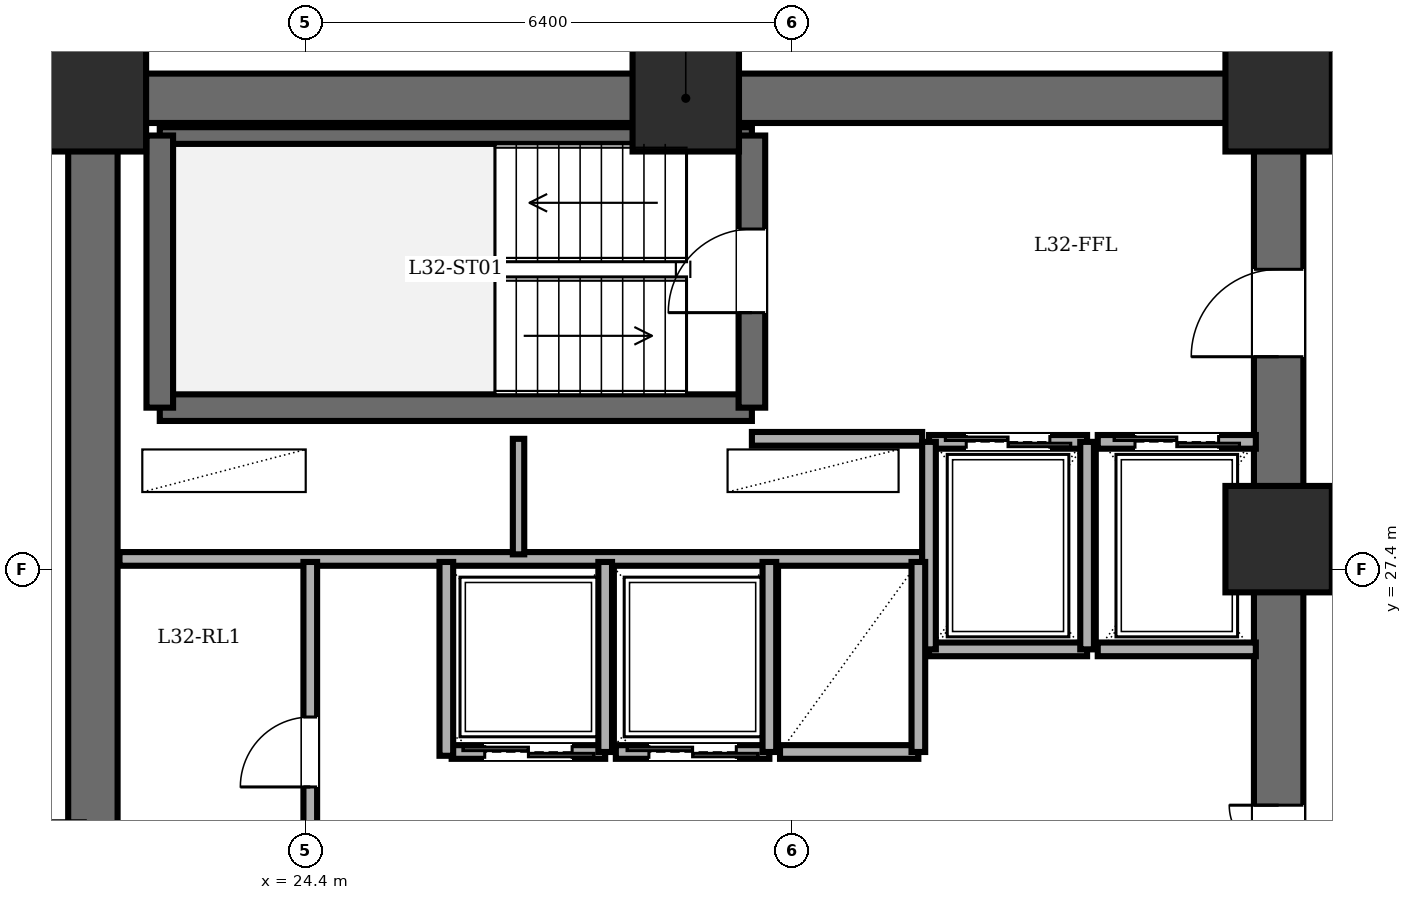
"""IFC4 building model, lengths in metres.
Left out: names, types, materials, properties, quantities, classifications, styles, units other than length and angle.
Written with IfcOpenShell. Run it as: python <this file> out.ifc"""

import sys

from ifc_helpers import new_model, si_unit, direction, frame, frame_2d, origin, origin_2d, place, context, subcontext, project, spatial, rectangle, extrude, element, fill, save


model = new_model("IFC4")
c1 = context("Model", 3, precision=1e-05, world=origin(), true_north=direction((0.0, 1.0)))
c2 = subcontext(c1, "Body", "Model", "MODEL_VIEW")
j1 = project(units=[si_unit("LENGTHUNIT", "METRE"), si_unit("PLANEANGLEUNIT", "RADIAN")], contexts=[c1])
p1 = place(None, origin())
s1 = spatial("IfcSite", under=j1, at=p1, CompositionType="ELEMENT")
p2 = place(p1, origin())
s2 = spatial("IfcBuilding", under=s1, at=p2, CompositionType="ELEMENT")
p3 = place(p2, frame((0.0, 0.0, 122.3)))
s3 = spatial("IfcBuildingStorey", under=s2, at=p3, CompositionType="ELEMENT", Elevation=122.3)
for number, where, z_axis, x_axis in (
    (1, (37.2, 27.8, 0.0), (0.0, 0.0, 1.0), (1.0, 0.0, 0.0)),
    (2, (37.2, 33.6, 0.0), (0.0, 0.0, 1.0), (1.0, 0.0, 0.0)),
    (3, (29.4, 33.6, 0.0), (0.0, 0.0, 1.0), (1.0, 0.0, 0.0)),
    (4, (21.6, 33.6, 0.0), (0.0, 0.0, 1.0), (1.0, 0.0, 0.0)),
):
    element("IfcColumn", number, at=place(p3, frame(where, z_axis=z_axis, x_axis=x_axis)), inside=s3, PredefinedType="COLUMN", context=c2, shape_type="SweptSolid", body=[
        extrude(rectangle(XDim=1.4, YDim=1.4, at=origin_2d()), origin(), (0.0, 0.0, 1.0), 3.6),
    ])
p4 = place(p3, frame((21.6, 14.4, 0.0), z_axis=(0.0, 0.0, 1.0), x_axis=(0.0, 1.0, 0.0)))
e5 = element("IfcWall", 5, at=p4, inside=s3, PredefinedType="SHEAR", context=c2, shape_type="SweptSolid", body=[
    extrude(rectangle(XDim=19.2, YDim=0.65, at=frame_2d((9.6, 0.0))), origin(), (0.0, 0.0, 1.0), 3.4),
])
p5 = place(p3, frame((21.6, 33.6, 0.0), z_axis=(0.0, 0.0, 1.0), x_axis=(1.0, 0.0, 0.0)))
e6 = element("IfcWall", 6, at=p5, inside=s3, PredefinedType="SHEAR", context=c2, shape_type="SweptSolid", body=[
    extrude(rectangle(XDim=15.6, YDim=0.65, at=frame_2d((7.8, 0.0))), origin(), (0.0, 0.0, 1.0), 3.4),
])
p6 = place(p3, frame((37.2, 14.4, 0.0), z_axis=(0.0, 0.0, 1.0), x_axis=(0.0, 1.0, 0.0)))
e7 = element("IfcWall", 7, at=p6, inside=s3, PredefinedType="SHEAR", context=c2, shape_type="SweptSolid", body=[
    extrude(rectangle(XDim=19.2, YDim=0.65, at=frame_2d((9.6, 0.0))), origin(), (0.0, 0.0, 1.0), 3.4),
])
p7 = place(p6, frame((15.8, 0.0, 0.0)))
e8 = element("IfcOpeningElement", 8, at=p7, cuts=e7, PredefinedType="OPENING", context=c2, shape_type="SweptSolid", body=[
    extrude(rectangle(XDim=1.15, YDim=2.15, at=frame_2d((0.575, 1.075))), frame((0.0, 0.335, 0.0), z_axis=(0.0, -1.0, 0.0), x_axis=(1.0, 0.0, 0.0)), (0.0, 0.0, 1.0), 0.67),
])
p8 = place(p6, frame((3.6, 0.0, 0.0)))
e9 = element("IfcOpeningElement", 9, at=p8, cuts=e7, PredefinedType="OPENING", context=c2, shape_type="SweptSolid", body=[
    extrude(rectangle(XDim=1.1, YDim=2.15, at=frame_2d((0.55, 1.075))), frame((0.0, 0.335, 0.0), z_axis=(0.0, -1.0, 0.0), x_axis=(1.0, 0.0, 0.0)), (0.0, 0.0, 1.0), 0.67),
])
p9 = place(p6, frame((8.6, 0.0, 0.0)))
e10 = element("IfcOpeningElement", 10, at=p9, cuts=e7, PredefinedType="OPENING", context=c2, shape_type="SweptSolid", body=[
    extrude(rectangle(XDim=1.3, YDim=2.2, at=frame_2d((0.65, 1.1))), frame((0.0, 0.335, 0.0), z_axis=(0.0, -1.0, 0.0), x_axis=(1.0, 0.0, 0.0)), (0.0, 0.0, 1.0), 0.67),
])
p10 = place(p3, frame((22.48, 29.53, 0.0), z_axis=(0.0, 0.0, 1.0), x_axis=(1.0, 0.0, 0.0)))
e11 = element("IfcWall", 11, at=p10, inside=s3, PredefinedType="SOLIDWALL", context=c2, shape_type="SweptSolid", body=[
    extrude(rectangle(XDim=7.79, YDim=0.35, at=frame_2d((3.895, 0.0))), origin(), (0.0, 0.0, 1.0), 3.4),
])
p11 = place(p3, frame((22.48, 33.11, 0.0), z_axis=(0.0, 0.0, 1.0), x_axis=(1.0, 0.0, 0.0)))
e12 = element("IfcWall", 12, at=p11, inside=s3, PredefinedType="PARTITIONING", context=c2, shape_type="SweptSolid", body=[
    extrude(rectangle(XDim=7.79, YDim=0.22, at=frame_2d((3.895, 0.0))), origin(), (0.0, 0.0, 1.0), 3.4),
])
p12 = place(p3, frame((22.48, 29.53, 0.0), z_axis=(0.0, 0.0, 1.0), x_axis=(0.0, 1.0, 0.0)))
e13 = element("IfcWall", 13, at=p12, inside=s3, PredefinedType="SOLIDWALL", context=c2, shape_type="SweptSolid", body=[
    extrude(rectangle(XDim=3.58, YDim=0.35, at=frame_2d((1.79, 0.0))), origin(), (0.0, 0.0, 1.0), 3.4),
])
p13 = place(p3, frame((30.27, 29.53, 0.0), z_axis=(0.0, 0.0, 1.0), x_axis=(0.0, 1.0, 0.0)))
e14 = element("IfcWall", 14, at=p13, inside=s3, PredefinedType="SOLIDWALL", context=c2, shape_type="SweptSolid", body=[
    extrude(rectangle(XDim=3.58, YDim=0.35, at=frame_2d((1.79, 0.0))), origin(), (0.0, 0.0, 1.0), 3.4),
])
p14 = place(p13, frame((1.25, 0.0, 0.0)))
e15 = element("IfcOpeningElement", 15, at=p14, cuts=e14, PredefinedType="OPENING", context=c2, shape_type="SweptSolid", body=[
    extrude(rectangle(XDim=1.1, YDim=2.15, at=frame_2d((0.55, 1.075))), frame((0.0, 0.185, 0.0), z_axis=(0.0, -1.0, 0.0), x_axis=(1.0, 0.0, 0.0)), (0.0, 0.0, 1.0), 0.37),
])
p15 = place(p3, frame((30.27, 29.12, 0.0), z_axis=(0.0, 0.0, 1.0), x_axis=(1.0, 0.0, 0.0)))
e16 = element("IfcWall", 16, at=p15, inside=s3, PredefinedType="PARTITIONING", context=c2, shape_type="SweptSolid", body=[
    extrude(rectangle(XDim=2.24, YDim=0.18, at=frame_2d((1.12, 0.0))), origin(), (0.0, 0.0, 1.0), 3.4),
])
p16 = place(p3, frame((21.95, 27.54, 0.0), z_axis=(0.0, 0.0, 1.0), x_axis=(1.0, 0.0, 0.0)))
e17 = element("IfcWall", 17, at=p16, inside=s3, PredefinedType="PARTITIONING", context=c2, shape_type="SweptSolid", body=[
    extrude(rectangle(XDim=10.56, YDim=0.18, at=frame_2d((5.28, 0.0))), origin(), (0.0, 0.0, 1.0), 3.4),
])
p17 = place(p3, frame((27.2, 27.6, 0.0), z_axis=(0.0, 0.0, 1.0), x_axis=(0.0, 1.0, 0.0)))
e18 = element("IfcWall", 18, at=p17, inside=s3, PredefinedType="PARTITIONING", context=c2, shape_type="SweptSolid", body=[
    extrude(rectangle(XDim=1.52, YDim=0.15, at=frame_2d((0.76, 0.0))), origin(), (0.0, 0.0, 1.0), 3.4),
])
p18 = place(p3, frame((32.6, 29.08, 0.0), z_axis=(0.0, 0.0, 1.0), x_axis=(1.0, 0.0, 0.0)))
e19 = element("IfcWall", 19, at=p18, inside=s3, PredefinedType="PARTITIONING", context=c2, shape_type="SweptSolid", body=[
    extrude(rectangle(XDim=2.08, YDim=0.18, at=frame_2d((1.04, 0.0))), origin(), (0.0, 0.0, 1.0), 3.4),
])
p19 = place(p18, frame((0.49, 0.0, 0.0)))
e20 = element("IfcOpeningElement", 20, at=p19, cuts=e19, PredefinedType="OPENING", context=c2, shape_type="SweptSolid", body=[
    extrude(rectangle(XDim=1.1, YDim=2.2, at=frame_2d((0.55, 1.1))), frame((0.0, 0.1, 0.0), z_axis=(0.0, -1.0, 0.0), x_axis=(1.0, 0.0, 0.0)), (0.0, 0.0, 1.0), 0.2),
])
p20 = place(p3, frame((34.68, 26.35, 0.0), z_axis=(0.0, 0.0, 1.0), x_axis=(-1.0, 0.0, 0.0)))
e21 = element("IfcWall", 21, at=p20, inside=s3, PredefinedType="PARTITIONING", context=c2, shape_type="SweptSolid", body=[
    extrude(rectangle(XDim=2.08, YDim=0.18, at=frame_2d((1.04, 0.0))), origin(), (0.0, 0.0, 1.0), 3.4),
])
for number, where, z_axis, x_axis in (
    (22, (34.68, 26.35, 0.0), (0.0, 0.0, 1.0), (0.0, 1.0, 0.0)),
    (23, (32.6, 29.08, 0.0), (0.0, 0.0, 1.0), (0.0, -1.0, 0.0)),
):
    element("IfcWall", number, at=place(p3, frame(where, z_axis=z_axis, x_axis=x_axis)), inside=s3, PredefinedType="PARTITIONING", context=c2, shape_type="SweptSolid", body=[
        extrude(rectangle(XDim=2.73, YDim=0.18, at=frame_2d((1.365, 0.0))), origin(), (0.0, 0.0, 1.0), 3.4),
    ])
p21 = place(p3, frame((34.82, 29.08, 0.0), z_axis=(0.0, 0.0, 1.0), x_axis=(1.0, 0.0, 0.0)))
e24 = element("IfcWall", 24, at=p21, inside=s3, PredefinedType="PARTITIONING", context=c2, shape_type="SweptSolid", body=[
    extrude(rectangle(XDim=2.08, YDim=0.18, at=frame_2d((1.04, 0.0))), origin(), (0.0, 0.0, 1.0), 3.4),
])
p22 = place(p21, frame((0.49, 0.0, 0.0)))
e25 = element("IfcOpeningElement", 25, at=p22, cuts=e24, PredefinedType="OPENING", context=c2, shape_type="SweptSolid", body=[
    extrude(rectangle(XDim=1.1, YDim=2.2, at=frame_2d((0.55, 1.1))), frame((0.0, 0.1, 0.0), z_axis=(0.0, -1.0, 0.0), x_axis=(1.0, 0.0, 0.0)), (0.0, 0.0, 1.0), 0.2),
])
p23 = place(p3, frame((36.9, 26.35, 0.0), z_axis=(0.0, 0.0, 1.0), x_axis=(-1.0, 0.0, 0.0)))
e26 = element("IfcWall", 26, at=p23, inside=s3, PredefinedType="PARTITIONING", context=c2, shape_type="SweptSolid", body=[
    extrude(rectangle(XDim=2.08, YDim=0.18, at=frame_2d((1.04, 0.0))), origin(), (0.0, 0.0, 1.0), 3.4),
])
p24 = place(p3, frame((28.34, 25.0, 0.0), z_axis=(0.0, 0.0, 1.0), x_axis=(-1.0, 0.0, 0.0)))
e27 = element("IfcWall", 27, at=p24, inside=s3, PredefinedType="PARTITIONING", context=c2, shape_type="SweptSolid", body=[
    extrude(rectangle(XDim=2.02, YDim=0.18, at=frame_2d((1.01, 0.0))), origin(), (0.0, 0.0, 1.0), 3.4),
])
p25 = place(p24, frame((0.435, 0.0, 0.0)))
e28 = element("IfcOpeningElement", 28, at=p25, cuts=e27, PredefinedType="OPENING", context=c2, shape_type="SweptSolid", body=[
    extrude(rectangle(XDim=1.15, YDim=2.2, at=frame_2d((0.575, 1.1))), frame((0.0, 0.1, 0.0), z_axis=(0.0, -1.0, 0.0), x_axis=(1.0, 0.0, 0.0)), (0.0, 0.0, 1.0), 0.2),
])
p26 = place(p3, frame((28.34, 25.0, 0.0), z_axis=(0.0, 0.0, 1.0), x_axis=(0.0, 1.0, 0.0)))
e29 = element("IfcWall", 29, at=p26, inside=s3, PredefinedType="PARTITIONING", context=c2, shape_type="SweptSolid", body=[
    extrude(rectangle(XDim=2.5, YDim=0.18, at=frame_2d((1.25, 0.0))), origin(), (0.0, 0.0, 1.0), 3.4),
])
p27 = place(p3, frame((30.5, 25.0, 0.0), z_axis=(0.0, 0.0, 1.0), x_axis=(-1.0, 0.0, 0.0)))
e30 = element("IfcWall", 30, at=p27, inside=s3, PredefinedType="PARTITIONING", context=c2, shape_type="SweptSolid", body=[
    extrude(rectangle(XDim=2.02, YDim=0.18, at=frame_2d((1.01, 0.0))), origin(), (0.0, 0.0, 1.0), 3.4),
])
p28 = place(p27, frame((0.435, 0.0, 0.0)))
e31 = element("IfcOpeningElement", 31, at=p28, cuts=e30, PredefinedType="OPENING", context=c2, shape_type="SweptSolid", body=[
    extrude(rectangle(XDim=1.15, YDim=2.2, at=frame_2d((0.575, 1.1))), frame((0.0, 0.1, 0.0), z_axis=(0.0, -1.0, 0.0), x_axis=(1.0, 0.0, 0.0)), (0.0, 0.0, 1.0), 0.2),
])
p29 = place(p3, frame((30.5, 25.0, 0.0), z_axis=(0.0, 0.0, 1.0), x_axis=(0.0, 1.0, 0.0)))
e32 = element("IfcWall", 32, at=p29, inside=s3, PredefinedType="PARTITIONING", context=c2, shape_type="SweptSolid", body=[
    extrude(rectangle(XDim=2.5, YDim=0.18, at=frame_2d((1.25, 0.0))), origin(), (0.0, 0.0, 1.0), 3.4),
])
p30 = place(p3, frame((32.46, 25.0, 0.0), z_axis=(0.0, 0.0, 1.0), x_axis=(-1.0, 0.0, 0.0)))
e33 = element("IfcWall", 33, at=p30, inside=s3, PredefinedType="PARTITIONING", context=c2, shape_type="SweptSolid", body=[
    extrude(rectangle(XDim=1.82, YDim=0.18, at=frame_2d((0.91, 0.0))), origin(), (0.0, 0.0, 1.0), 3.4),
])
p31 = place(p3, frame((32.46, 25.0, 0.0), z_axis=(0.0, 0.0, 1.0), x_axis=(0.0, 1.0, 0.0)))
e34 = element("IfcWall", 34, at=p31, inside=s3, PredefinedType="PARTITIONING", context=c2, shape_type="SweptSolid", body=[
    extrude(rectangle(XDim=2.5, YDim=0.18, at=frame_2d((1.25, 0.0))), origin(), (0.0, 0.0, 1.0), 3.4),
])
p32 = place(p3, frame((24.46, 22.5, 0.0), z_axis=(0.0, 0.0, 1.0), x_axis=(0.0, 1.0, 0.0)))
e35 = element("IfcWall", 35, at=p32, inside=s3, PredefinedType="PARTITIONING", context=c2, shape_type="SweptSolid", body=[
    extrude(rectangle(XDim=5.0, YDim=0.18, at=frame_2d((2.5, 0.0))), origin(), (0.0, 0.0, 1.0), 3.4),
])
p33 = place(p32, frame((2.04, 0.0, 0.0)))
e36 = element("IfcOpeningElement", 36, at=p33, cuts=e35, PredefinedType="OPENING", context=c2, shape_type="SweptSolid", body=[
    extrude(rectangle(XDim=0.92, YDim=2.1, at=frame_2d((0.46, 1.05))), frame((0.0, 0.1, 0.0), z_axis=(0.0, -1.0, 0.0), x_axis=(1.0, 0.0, 0.0)), (0.0, 0.0, 1.0), 0.2),
])
p34 = place(p3, frame((26.25, 24.95, 0.0), z_axis=(0.0, 0.0, 1.0), x_axis=(0.0, 1.0, 0.0)))
e37 = element("IfcWall", 37, at=p34, inside=s3, PredefinedType="PARTITIONING", context=c2, shape_type="SweptSolid", body=[
    extrude(rectangle(XDim=2.55, YDim=0.18, at=frame_2d((1.275, 0.0))), origin(), (0.0, 0.0, 1.0), 3.4),
])
p35 = place(p3, frame((8.8, 33.82, 0.0), z_axis=(0.0, 0.0, 1.0), x_axis=(1.0, 0.0, 0.0)))
e38 = element("IfcWall", 38, at=p35, inside=s3, PredefinedType="PARTITIONING", context=c2, shape_type="SweptSolid", body=[
    extrude(rectangle(XDim=12.68, YDim=0.15, at=frame_2d((6.34, 0.0))), origin(), (0.0, 0.0, 1.0), 3.4),
])
p36 = place(p35, frame((6.18, 0.0, 0.0)))
e39 = element("IfcOpeningElement", 39, at=p36, cuts=e38, PredefinedType="OPENING", context=c2, shape_type="SweptSolid", body=[
    extrude(rectangle(XDim=1.0, YDim=2.15, at=frame_2d((0.5, 1.075))), frame((0.0, 0.085, 0.0), z_axis=(0.0, -1.0, 0.0), x_axis=(1.0, 0.0, 0.0)), (0.0, 0.0, 1.0), 0.17),
])
p37 = place(p14, origin())
e40 = element("IfcDoor", 40, at=p37, inside=s3, OperationType="SINGLE_SWING_LEFT", PredefinedType="DOOR", context=c2, shape_type="SweptSolid", body=[
    extrude(rectangle(XDim=1.1, YDim=2.15, at=frame_2d((0.55, 1.075))), frame((0.0, 0.025, 0.0), z_axis=(0.0, -1.0, 0.0), x_axis=(1.0, 0.0, 0.0)), (0.0, 0.0, 1.0), 0.05),
])
fill(e15, e40)
p38 = place(p7, origin())
e41 = element("IfcDoor", 41, at=p38, inside=s3, OperationType="SINGLE_SWING_LEFT", PredefinedType="DOOR", context=c2, shape_type="SweptSolid", body=[
    extrude(rectangle(XDim=1.15, YDim=2.15, at=frame_2d((0.575, 1.075))), frame((0.0, 0.025, 0.0), z_axis=(0.0, -1.0, 0.0), x_axis=(1.0, 0.0, 0.0)), (0.0, 0.0, 1.0), 0.05),
])
fill(e8, e41)
p39 = place(p19, origin())
e42 = element("IfcDoor", 42, at=p39, inside=s3, OperationType="DOUBLE_DOOR_SLIDING", PredefinedType="DOOR", context=c2, shape_type="SweptSolid", body=[
    extrude(rectangle(XDim=1.1, YDim=2.2, at=frame_2d((0.55, 1.1))), frame((0.0, 0.025, 0.0), z_axis=(0.0, -1.0, 0.0), x_axis=(1.0, 0.0, 0.0)), (0.0, 0.0, 1.0), 0.05),
])
fill(e20, e42)
p40 = place(p22, origin())
e43 = element("IfcDoor", 43, at=p40, inside=s3, OperationType="DOUBLE_DOOR_SLIDING", PredefinedType="DOOR", context=c2, shape_type="SweptSolid", body=[
    extrude(rectangle(XDim=1.1, YDim=2.2, at=frame_2d((0.55, 1.1))), frame((0.0, 0.025, 0.0), z_axis=(0.0, -1.0, 0.0), x_axis=(1.0, 0.0, 0.0)), (0.0, 0.0, 1.0), 0.05),
])
fill(e25, e43)
p41 = place(p25, origin())
e44 = element("IfcDoor", 44, at=p41, inside=s3, OperationType="DOUBLE_DOOR_SLIDING", PredefinedType="DOOR", context=c2, shape_type="SweptSolid", body=[
    extrude(rectangle(XDim=1.15, YDim=2.2, at=frame_2d((0.575, 1.1))), frame((0.0, 0.025, 0.0), z_axis=(0.0, -1.0, 0.0), x_axis=(1.0, 0.0, 0.0)), (0.0, 0.0, 1.0), 0.05),
])
fill(e28, e44)
p42 = place(p28, origin())
e45 = element("IfcDoor", 45, at=p42, inside=s3, OperationType="DOUBLE_DOOR_SLIDING", PredefinedType="DOOR", context=c2, shape_type="SweptSolid", body=[
    extrude(rectangle(XDim=1.15, YDim=2.2, at=frame_2d((0.575, 1.1))), frame((0.0, 0.025, 0.0), z_axis=(0.0, -1.0, 0.0), x_axis=(1.0, 0.0, 0.0)), (0.0, 0.0, 1.0), 0.05),
])
fill(e31, e45)
p43 = place(p33, origin())
e46 = element("IfcDoor", 46, at=p43, inside=s3, OperationType="SINGLE_SWING_LEFT", PredefinedType="DOOR", context=c2, shape_type="SweptSolid", body=[
    extrude(rectangle(XDim=0.92, YDim=2.1, at=frame_2d((0.46, 1.05))), frame((0.0, 0.025, 0.0), z_axis=(0.0, -1.0, 0.0), x_axis=(1.0, 0.0, 0.0)), (0.0, 0.0, 1.0), 0.05),
])
fill(e36, e46)
p44 = place(p9, origin())
e47 = element("IfcDoor", 47, at=p44, inside=s3, OperationType="DOUBLE_DOOR_SINGLE_SWING", PredefinedType="DOOR", context=c2, shape_type="SweptSolid", body=[
    extrude(rectangle(XDim=1.3, YDim=2.2, at=frame_2d((0.65, 1.1))), frame((0.0, 0.025, 0.0), z_axis=(0.0, -1.0, 0.0), x_axis=(1.0, 0.0, 0.0)), (0.0, 0.0, 1.0), 0.05),
])
fill(e10, e47)
save(model, sys.argv[1])
